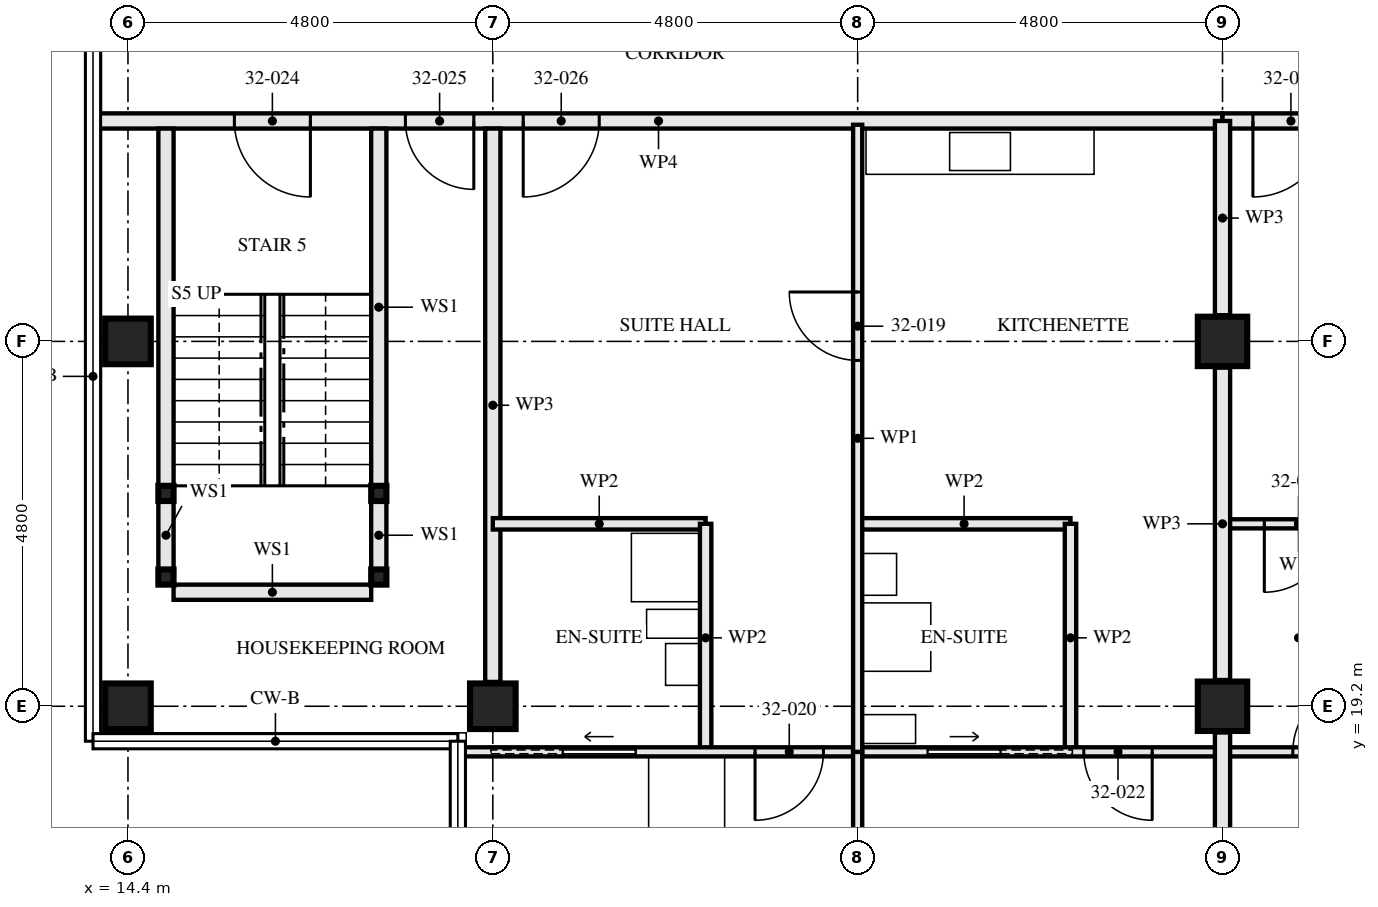
"""IFC4 building model, lengths in metres.
Left out: names, types, materials, properties, quantities, classifications, styles, units other than length and angle.
Written with IfcOpenShell. Run it as: python <this file> out.ifc"""

import sys

from ifc_helpers import new_model, si_unit, direction, frame, frame_2d, origin, origin_2d, place, context, subcontext, project, spatial, rectangle, hollow_rectangle, extrude, element, fill, save


model = new_model("IFC4")
c1 = context("Model", 3, precision=1e-05, world=origin(), true_north=direction((0.0, 1.0)))
c2 = subcontext(c1, "Body", "Model", "MODEL_VIEW")
j1 = project(units=[si_unit("LENGTHUNIT", "METRE"), si_unit("PLANEANGLEUNIT", "RADIAN")], contexts=[c1])
p1 = place(None, origin())
s1 = spatial("IfcSite", under=j1, at=p1, CompositionType="ELEMENT")
p2 = place(p1, origin())
s2 = spatial("IfcBuilding", under=s1, at=p2, CompositionType="ELEMENT")
p3 = place(p2, frame((0.0, 0.0, 119.0)))
s3 = spatial("IfcBuildingStorey", under=s2, at=p3, CompositionType="ELEMENT", Elevation=119.0)
for number, where, z_axis, x_axis in (
    (1, (14.4, 19.2, 0.0), (0.0, 0.0, 1.0), (0.0, 1.0, 0.0)),
    (2, (14.4, 24.0, 0.0), (0.0, 0.0, 1.0), (1.0, 0.0, 0.0)),
    (3, (19.2, 19.2, 0.0), (0.0, 0.0, 1.0), (0.0, 1.0, 0.0)),
):
    element("IfcColumn", number, at=place(p3, frame(where, z_axis=z_axis, x_axis=x_axis)), inside=s3, PredefinedType="COLUMN", context=c2, shape_type="SweptSolid", body=[
        extrude(hollow_rectangle(XDim=0.6, YDim=0.6, WallThickness=0.08, at=origin_2d()), origin(), (0.0, 0.0, 1.0), 3.5),
    ])
for number, where, z_axis, x_axis in (
    (4, (28.8, 19.2, 0.0), (0.0, 0.0, 1.0), (1.0, 0.0, 0.0)),
    (5, (28.8, 24.0, 0.0), (0.0, 0.0, 1.0), (1.0, 0.0, 0.0)),
):
    element("IfcColumn", number, at=place(p3, frame(where, z_axis=z_axis, x_axis=x_axis)), inside=s3, PredefinedType="COLUMN", context=c2, shape_type="SweptSolid", body=[
        extrude(hollow_rectangle(XDim=0.65, YDim=0.65, WallThickness=0.05, at=origin_2d()), origin(), (0.0, 0.0, 1.0), 3.5),
    ])
for number, where, z_axis, x_axis in (
    (6, (14.9, 20.9, 0.0), (0.0, 0.0, 1.0), (1.0, 0.0, 0.0)),
    (7, (17.7, 20.9, 0.0), (0.0, 0.0, 1.0), (1.0, 0.0, 0.0)),
    (8, (14.9, 22.0, 0.0), (0.0, 0.0, 1.0), (1.0, 0.0, 0.0)),
    (9, (17.7, 22.0, 0.0), (0.0, 0.0, 1.0), (1.0, 0.0, 0.0)),
):
    element("IfcColumn", number, at=place(p3, frame(where, z_axis=z_axis, x_axis=x_axis)), inside=s3, PredefinedType="COLUMN", context=c2, shape_type="SweptSolid", body=[
        extrude(hollow_rectangle(XDim=0.2, YDim=0.2, WallThickness=0.008, at=origin_2d()), origin(), (0.0, 0.0, 1.0), 3.33),
    ])
p4 = place(p3, frame((14.9, 21.0, 0.0), z_axis=(0.0, 0.0, 1.0), x_axis=(0.0, 1.0, 0.0)))
e10 = element("IfcWall", 10, at=p4, inside=s3, PredefinedType="SOLIDWALL", context=c2, shape_type="SweptSolid", body=[
    extrude(rectangle(XDim=0.9, YDim=0.2, at=frame_2d((0.45, 0.0))), origin(), (0.0, 0.0, 1.0), 2.99),
])
p5 = place(p3, frame((14.9, 22.1, 0.0), z_axis=(0.0, 0.0, 1.0), x_axis=(0.0, 1.0, 0.0)))
e11 = element("IfcWall", 11, at=p5, inside=s3, PredefinedType="SOLIDWALL", context=c2, shape_type="SweptSolid", body=[
    extrude(rectangle(XDim=4.7, YDim=0.2, at=frame_2d((2.35, 0.0))), origin(), (0.0, 0.0, 1.0), 2.99),
])
p6 = place(p3, frame((17.7, 21.0, 0.0), z_axis=(0.0, 0.0, 1.0), x_axis=(0.0, 1.0, 0.0)))
e12 = element("IfcWall", 12, at=p6, inside=s3, PredefinedType="SOLIDWALL", context=c2, shape_type="SweptSolid", body=[
    extrude(rectangle(XDim=0.9, YDim=0.2, at=frame_2d((0.45, 0.0))), origin(), (0.0, 0.0, 1.0), 2.99),
])
p7 = place(p3, frame((17.7, 22.1, 0.0), z_axis=(0.0, 0.0, 1.0), x_axis=(0.0, 1.0, 0.0)))
e13 = element("IfcWall", 13, at=p7, inside=s3, PredefinedType="SOLIDWALL", context=c2, shape_type="SweptSolid", body=[
    extrude(rectangle(XDim=4.7, YDim=0.2, at=frame_2d((2.35, 0.0))), origin(), (0.0, 0.0, 1.0), 2.99),
])
p8 = place(p3, frame((15.0, 20.7, 0.0), z_axis=(0.0, 0.0, 1.0), x_axis=(1.0, 0.0, 0.0)))
e14 = element("IfcWall", 14, at=p8, inside=s3, PredefinedType="SOLIDWALL", context=c2, shape_type="SweptSolid", body=[
    extrude(rectangle(XDim=2.6, YDim=0.2, at=frame_2d((1.3, 0.0))), origin(), (0.0, 0.0, 1.0), 3.33),
])
p9 = place(p3, frame((19.2, 19.52, 0.0), z_axis=(0.0, 0.0, 1.0), x_axis=(0.0, 1.0, 0.0)))
e15 = element("IfcWall", 15, at=p9, inside=s3, PredefinedType="PARTITIONING", context=c2, shape_type="SweptSolid", body=[
    extrude(rectangle(XDim=7.28, YDim=0.2, at=frame_2d((3.64, 0.0))), origin(), (0.0, 0.0, 1.0), 2.55),
])
p10 = place(p3, frame((22.0, 18.6, 0.0), z_axis=(0.0, 0.0, 1.0), x_axis=(0.0, 1.0, 0.0)))
e16 = element("IfcWall", 16, at=p10, inside=s3, PredefinedType="PARTITIONING", context=c2, shape_type="SweptSolid", body=[
    extrude(rectangle(XDim=3.0, YDim=0.15, at=frame_2d((1.5, 0.0))), origin(), (0.0, 0.0, 1.0), 2.55),
])
p11 = place(p3, frame((19.2, 21.6, 0.0), z_axis=(0.0, 0.0, 1.0), x_axis=(1.0, 0.0, 0.0)))
e17 = element("IfcWall", 17, at=p11, inside=s3, PredefinedType="PARTITIONING", context=c2, shape_type="SweptSolid", body=[
    extrude(rectangle(XDim=2.8, YDim=0.15, at=frame_2d((1.4, 0.0))), origin(), (0.0, 0.0, 1.0), 3.33),
])
p12 = place(p3, frame((26.8, 18.6, 0.0), z_axis=(0.0, 0.0, 1.0), x_axis=(0.0, 1.0, 0.0)))
e18 = element("IfcWall", 18, at=p12, inside=s3, PredefinedType="PARTITIONING", context=c2, shape_type="SweptSolid", body=[
    extrude(rectangle(XDim=3.0, YDim=0.15, at=frame_2d((1.5, 0.0))), origin(), (0.0, 0.0, 1.0), 2.55),
])
p13 = place(p3, frame((24.0, 21.6, 0.0), z_axis=(0.0, 0.0, 1.0), x_axis=(1.0, 0.0, 0.0)))
e19 = element("IfcWall", 19, at=p13, inside=s3, PredefinedType="PARTITIONING", context=c2, shape_type="SweptSolid", body=[
    extrude(rectangle(XDim=2.8, YDim=0.15, at=frame_2d((1.4, 0.0))), origin(), (0.0, 0.0, 1.0), 3.33),
])
p14 = place(p3, frame((24.0, 18.6, 0.0), z_axis=(0.0, 0.0, 1.0), x_axis=(0.0, 1.0, 0.0)))
e20 = element("IfcWall", 20, at=p14, inside=s3, PredefinedType="PARTITIONING", context=c2, shape_type="SweptSolid", body=[
    extrude(rectangle(XDim=8.25, YDim=0.12, at=frame_2d((4.125, 0.0))), origin(), (0.0, 0.0, 1.0), 2.55),
])
p15 = place(p14, frame((5.15, 0.0, 0.0)))
e21 = element("IfcOpeningElement", 21, at=p15, cuts=e20, PredefinedType="OPENING", context=c2, shape_type="SweptSolid", body=[
    extrude(rectangle(XDim=0.9, YDim=2.1, at=frame_2d((0.45, 1.05))), frame((0.0, 0.071, 0.0), z_axis=(0.0, -1.0, 0.0), x_axis=(1.0, 0.0, 0.0)), (0.0, 0.0, 1.0), 0.141),
])
p16 = place(p3, frame((18.76, 18.6, 0.0), z_axis=(0.0, 0.0, 1.0), x_axis=(1.0, 0.0, 0.0)))
e22 = element("IfcWall", 22, at=p16, inside=s3, PredefinedType="PARTITIONING", context=c2, shape_type="SweptSolid", body=[
    extrude(rectangle(XDim=5.24, YDim=0.12, at=frame_2d((2.62, 0.0))), origin(), (0.0, 0.0, 1.0), 2.32),
])
p17 = place(p16, frame((3.89, 0.0, 0.0)))
e23 = element("IfcOpeningElement", 23, at=p17, cuts=e22, PredefinedType="OPENING", context=c2, shape_type="SweptSolid", body=[
    extrude(rectangle(XDim=0.9, YDim=2.1, at=frame_2d((0.45, 1.05))), frame((0.0, 0.071, 0.0), z_axis=(0.0, -1.0, 0.0), x_axis=(1.0, 0.0, 0.0)), (0.0, 0.0, 1.0), 0.141),
])
p18 = place(p16, frame((1.365, 0.0, 0.0)))
e24 = element("IfcOpeningElement", 24, at=p18, cuts=e22, PredefinedType="OPENING", context=c2, shape_type="SweptSolid", body=[
    extrude(rectangle(XDim=0.95, YDim=2.1, at=frame_2d((0.475, 1.05))), frame((0.0, 0.071, 0.0), z_axis=(0.0, -1.0, 0.0), x_axis=(1.0, 0.0, 0.0)), (0.0, 0.0, 1.0), 0.141),
])
p19 = place(p3, frame((24.0, 18.6, 0.0), z_axis=(0.0, 0.0, 1.0), x_axis=(1.0, 0.0, 0.0)))
e25 = element("IfcWall", 25, at=p19, inside=s3, PredefinedType="PARTITIONING", context=c2, shape_type="SweptSolid", body=[
    extrude(rectangle(XDim=4.8, YDim=0.12, at=frame_2d((2.4, 0.0))), origin(), (0.0, 0.0, 1.0), 3.33),
])
p20 = place(p19, frame((2.975, 0.0, 0.0)))
e26 = element("IfcOpeningElement", 26, at=p20, cuts=e25, PredefinedType="OPENING", context=c2, shape_type="SweptSolid", body=[
    extrude(rectangle(XDim=0.9, YDim=2.1, at=frame_2d((0.45, 1.05))), frame((0.0, 0.071, 0.0), z_axis=(0.0, -1.0, 0.0), x_axis=(1.0, 0.0, 0.0)), (0.0, 0.0, 1.0), 0.141),
])
p21 = place(p19, frame((0.925, 0.0, 0.0)))
e27 = element("IfcOpeningElement", 27, at=p21, cuts=e25, PredefinedType="OPENING", context=c2, shape_type="SweptSolid", body=[
    extrude(rectangle(XDim=0.95, YDim=2.1, at=frame_2d((0.475, 1.05))), frame((0.0, 0.071, 0.0), z_axis=(0.0, -1.0, 0.0), x_axis=(1.0, 0.0, 0.0)), (0.0, 0.0, 1.0), 0.141),
])
p22 = place(p3, frame((24.0, 14.72, 0.0), z_axis=(0.0, 0.0, 1.0), x_axis=(0.0, 1.0, 0.0)))
e28 = element("IfcWall", 28, at=p22, inside=s3, PredefinedType="PARTITIONING", context=c2, shape_type="SweptSolid", body=[
    extrude(rectangle(XDim=3.88, YDim=0.12, at=frame_2d((1.94, 0.0))), origin(), (0.0, 0.0, 1.0), 3.33),
])
p23 = place(p3, frame((13.96, 26.9, 0.0), z_axis=(0.0, 0.0, 1.0), x_axis=(1.0, 0.0, 0.0)))
e29 = element("IfcWall", 29, at=p23, inside=s3, PredefinedType="PARTITIONING", context=c2, shape_type="SweptSolid", body=[
    extrude(rectangle(XDim=14.84, YDim=0.2, at=frame_2d((7.42, 0.0))), origin(), (0.0, 0.0, 1.0), 2.32),
])
p24 = place(p23, frame((1.84, 0.0, 0.0)))
e30 = element("IfcOpeningElement", 30, at=p24, cuts=e29, PredefinedType="OPENING", context=c2, shape_type="SweptSolid", body=[
    extrude(rectangle(XDim=1.0, YDim=2.1, at=frame_2d((0.5, 1.05))), frame((0.0, 0.111, 0.0), z_axis=(0.0, -1.0, 0.0), x_axis=(1.0, 0.0, 0.0)), (0.0, 0.0, 1.0), 0.221),
])
p25 = place(p23, frame((4.09, 0.0, 0.0)))
e31 = element("IfcOpeningElement", 31, at=p25, cuts=e29, PredefinedType="OPENING", context=c2, shape_type="SweptSolid", body=[
    extrude(rectangle(XDim=0.9, YDim=2.1, at=frame_2d((0.45, 1.05))), frame((0.0, 0.111, 0.0), z_axis=(0.0, -1.0, 0.0), x_axis=(1.0, 0.0, 0.0)), (0.0, 0.0, 1.0), 0.221),
])
p26 = place(p23, frame((5.64, 0.0, 0.0)))
e32 = element("IfcOpeningElement", 32, at=p26, cuts=e29, PredefinedType="OPENING", context=c2, shape_type="SweptSolid", body=[
    extrude(rectangle(XDim=1.0, YDim=2.1, at=frame_2d((0.5, 1.05))), frame((0.0, 0.111, 0.0), z_axis=(0.0, -1.0, 0.0), x_axis=(1.0, 0.0, 0.0)), (0.0, 0.0, 1.0), 0.221),
])
p27 = place(p3, frame((28.8, 21.6, 0.0), z_axis=(0.0, 0.0, 1.0), x_axis=(1.0, 0.0, 0.0)))
e33 = element("IfcWall", 33, at=p27, inside=s3, PredefinedType="PARTITIONING", context=c2, shape_type="SweptSolid", body=[
    extrude(rectangle(XDim=2.0, YDim=0.12, at=frame_2d((1.0, 0.0))), origin(), (0.0, 0.0, 1.0), 3.33),
])
p28 = place(p27, frame((0.55, 0.0, 0.0)))
e34 = element("IfcOpeningElement", 34, at=p28, cuts=e33, PredefinedType="OPENING", context=c2, shape_type="SweptSolid", body=[
    extrude(rectangle(XDim=0.9, YDim=2.1, at=frame_2d((0.45, 1.05))), frame((0.0, 0.071, 0.0), z_axis=(0.0, -1.0, 0.0), x_axis=(1.0, 0.0, 0.0)), (0.0, 0.0, 1.0), 0.141),
])
p29 = place(p3, frame((28.8, 18.6, 0.0), z_axis=(0.0, 0.0, 1.0), x_axis=(1.0, 0.0, 0.0)))
e35 = element("IfcWall", 35, at=p29, inside=s3, PredefinedType="PARTITIONING", context=c2, shape_type="SweptSolid", body=[
    extrude(rectangle(XDim=4.8, YDim=0.12, at=frame_2d((2.4, 0.0))), origin(), (0.0, 0.0, 1.0), 3.33),
])
p30 = place(p29, frame((0.925, 0.0, 0.0)))
e36 = element("IfcOpeningElement", 36, at=p30, cuts=e35, PredefinedType="OPENING", context=c2, shape_type="SweptSolid", body=[
    extrude(rectangle(XDim=0.9, YDim=2.1, at=frame_2d((0.45, 1.05))), frame((0.0, 0.071, 0.0), z_axis=(0.0, -1.0, 0.0), x_axis=(1.0, 0.0, 0.0)), (0.0, 0.0, 1.0), 0.141),
])
p31 = place(p29, frame((2.925, 0.0, 0.0)))
e37 = element("IfcOpeningElement", 37, at=p31, cuts=e35, PredefinedType="OPENING", context=c2, shape_type="SweptSolid", body=[
    extrude(rectangle(XDim=0.95, YDim=2.1, at=frame_2d((0.475, 1.05))), frame((0.0, 0.071, 0.0), z_axis=(0.0, -1.0, 0.0), x_axis=(1.0, 0.0, 0.0)), (0.0, 0.0, 1.0), 0.141),
])
p32 = place(p3, frame((28.8, 26.9, 0.0), z_axis=(0.0, 0.0, 1.0), x_axis=(1.0, 0.0, 0.0)))
e38 = element("IfcWall", 38, at=p32, inside=s3, PredefinedType="PARTITIONING", context=c2, shape_type="SweptSolid", body=[
    extrude(rectangle(XDim=9.6, YDim=0.2, at=frame_2d((4.8, 0.0))), origin(), (0.0, 0.0, 1.0), 3.33),
])
p33 = place(p32, frame((0.4, 0.0, 0.0)))
e39 = element("IfcOpeningElement", 39, at=p33, cuts=e38, PredefinedType="OPENING", context=c2, shape_type="SweptSolid", body=[
    extrude(rectangle(XDim=1.0, YDim=2.1, at=frame_2d((0.5, 1.05))), frame((0.0, 0.111, 0.0), z_axis=(0.0, -1.0, 0.0), x_axis=(1.0, 0.0, 0.0)), (0.0, 0.0, 1.0), 0.221),
])
p34 = place(p32, frame((5.2, 0.0, 0.0)))
e40 = element("IfcOpeningElement", 40, at=p34, cuts=e38, PredefinedType="OPENING", context=c2, shape_type="SweptSolid", body=[
    extrude(rectangle(XDim=1.0, YDim=2.1, at=frame_2d((0.5, 1.05))), frame((0.0, 0.111, 0.0), z_axis=(0.0, -1.0, 0.0), x_axis=(1.0, 0.0, 0.0)), (0.0, 0.0, 1.0), 0.221),
])
p35 = place(p3, frame((28.8, 14.72, 0.0), z_axis=(0.0, 0.0, 1.0), x_axis=(0.0, 1.0, 0.0)))
e41 = element("IfcWall", 41, at=p35, inside=s3, PredefinedType="PARTITIONING", context=c2, shape_type="SweptSolid", body=[
    extrude(rectangle(XDim=4.135, YDim=0.2, at=frame_2d((2.067, 0.0))), origin(), (0.0, 0.0, 1.0), 2.32),
])
p36 = place(p3, frame((28.8, 19.545, 0.0), z_axis=(0.0, 0.0, 1.0), x_axis=(0.0, 1.0, 0.0)))
e42 = element("IfcWall", 42, at=p36, inside=s3, PredefinedType="PARTITIONING", context=c2, shape_type="SweptSolid", body=[
    extrude(rectangle(XDim=4.11, YDim=0.2, at=frame_2d((2.055, 0.0))), origin(), (0.0, 0.0, 1.0), 2.32),
])
p37 = place(p3, frame((28.8, 24.345, 0.0), z_axis=(0.0, 0.0, 1.0), x_axis=(0.0, 1.0, 0.0)))
e43 = element("IfcWall", 43, at=p37, inside=s3, PredefinedType="PARTITIONING", context=c2, shape_type="SweptSolid", body=[
    extrude(rectangle(XDim=2.555, YDim=0.2, at=frame_2d((1.277, 0.0))), origin(), (0.0, 0.0, 1.0), 2.32),
])
p38 = place(p15, origin())
e44 = element("IfcDoor", 44, at=p38, inside=s3, OperationType="SINGLE_SWING_LEFT", PredefinedType="DOOR", context=c2, shape_type="SweptSolid", body=[
    extrude(rectangle(XDim=0.9, YDim=2.1, at=frame_2d((0.45, 1.05))), frame((0.0, 0.022, 0.0), z_axis=(0.0, -1.0, 0.0), x_axis=(1.0, 0.0, 0.0)), (0.0, 0.0, 1.0), 0.044),
])
fill(e21, e44)
p39 = place(p17, frame((0.9, 0.0, 0.0), z_axis=(0.0, 0.0, 1.0), x_axis=(-1.0, 0.0, 0.0)))
e45 = element("IfcDoor", 45, at=p39, inside=s3, OperationType="SINGLE_SWING_LEFT", PredefinedType="DOOR", context=c2, shape_type="SweptSolid", body=[
    extrude(rectangle(XDim=0.9, YDim=2.1, at=frame_2d((0.45, 1.05))), frame((0.0, 0.022, 0.0), z_axis=(0.0, -1.0, 0.0), x_axis=(1.0, 0.0, 0.0)), (0.0, 0.0, 1.0), 0.044),
])
fill(e23, e45)
p40 = place(p18, origin())
e46 = element("IfcDoor", 46, at=p40, inside=s3, OperationType="SLIDING_TO_RIGHT", PredefinedType="DOOR", context=c2, shape_type="SweptSolid", body=[
    extrude(rectangle(XDim=0.95, YDim=2.1, at=frame_2d((0.475, 1.05))), frame((0.0, 0.022, 0.0), z_axis=(0.0, -1.0, 0.0), x_axis=(1.0, 0.0, 0.0)), (0.0, 0.0, 1.0), 0.044),
])
fill(e24, e46)
p41 = place(p20, frame((0.9, 0.0, 0.0), z_axis=(0.0, 0.0, 1.0), x_axis=(-1.0, 0.0, 0.0)))
e47 = element("IfcDoor", 47, at=p41, inside=s3, OperationType="SINGLE_SWING_RIGHT", PredefinedType="DOOR", context=c2, shape_type="SweptSolid", body=[
    extrude(rectangle(XDim=0.9, YDim=2.1, at=frame_2d((0.45, 1.05))), frame((0.0, 0.022, 0.0), z_axis=(0.0, -1.0, 0.0), x_axis=(1.0, 0.0, 0.0)), (0.0, 0.0, 1.0), 0.044),
])
fill(e26, e47)
p42 = place(p21, origin())
e48 = element("IfcDoor", 48, at=p42, inside=s3, OperationType="SLIDING_TO_LEFT", PredefinedType="DOOR", context=c2, shape_type="SweptSolid", body=[
    extrude(rectangle(XDim=0.95, YDim=2.1, at=frame_2d((0.475, 1.05))), frame((0.0, 0.022, 0.0), z_axis=(0.0, -1.0, 0.0), x_axis=(1.0, 0.0, 0.0)), (0.0, 0.0, 1.0), 0.044),
])
fill(e27, e48)
p43 = place(p24, frame((1.0, 0.0, 0.0), z_axis=(0.0, 0.0, 1.0), x_axis=(-1.0, 0.0, 0.0)))
e49 = element("IfcDoor", 49, at=p43, inside=s3, OperationType="SINGLE_SWING_RIGHT", PredefinedType="DOOR", context=c2, shape_type="SweptSolid", body=[
    extrude(rectangle(XDim=1.0, YDim=2.1, at=frame_2d((0.5, 1.05))), frame((0.0, 0.032, 0.0), z_axis=(0.0, -1.0, 0.0), x_axis=(1.0, 0.0, 0.0)), (0.0, 0.0, 1.0), 0.064),
])
fill(e30, e49)
p44 = place(p25, frame((0.9, 0.0, 0.0), z_axis=(0.0, 0.0, 1.0), x_axis=(-1.0, 0.0, 0.0)))
e50 = element("IfcDoor", 50, at=p44, inside=s3, OperationType="SINGLE_SWING_RIGHT", PredefinedType="DOOR", context=c2, shape_type="SweptSolid", body=[
    extrude(rectangle(XDim=0.9, YDim=2.1, at=frame_2d((0.45, 1.05))), frame((0.0, 0.027, 0.0), z_axis=(0.0, -1.0, 0.0), x_axis=(1.0, 0.0, 0.0)), (0.0, 0.0, 1.0), 0.054),
])
fill(e31, e50)
p45 = place(p26, frame((1.0, 0.0, 0.0), z_axis=(0.0, 0.0, 1.0), x_axis=(-1.0, 0.0, 0.0)))
e51 = element("IfcDoor", 51, at=p45, inside=s3, OperationType="SINGLE_SWING_LEFT", PredefinedType="DOOR", context=c2, shape_type="SweptSolid", body=[
    extrude(rectangle(XDim=1.0, YDim=2.1, at=frame_2d((0.5, 1.05))), frame((0.0, 0.027, 0.0), z_axis=(0.0, -1.0, 0.0), x_axis=(1.0, 0.0, 0.0)), (0.0, 0.0, 1.0), 0.054),
])
fill(e32, e51)
p46 = place(p28, frame((0.9, 0.0, 0.0), z_axis=(0.0, 0.0, 1.0), x_axis=(-1.0, 0.0, 0.0)))
e52 = element("IfcDoor", 52, at=p46, inside=s3, OperationType="SINGLE_SWING_LEFT", PredefinedType="DOOR", context=c2, shape_type="SweptSolid", body=[
    extrude(rectangle(XDim=0.9, YDim=2.1, at=frame_2d((0.45, 1.05))), frame((0.0, 0.022, 0.0), z_axis=(0.0, -1.0, 0.0), x_axis=(1.0, 0.0, 0.0)), (0.0, 0.0, 1.0), 0.044),
])
fill(e34, e52)
p47 = place(p30, origin())
e53 = element("IfcDoor", 53, at=p47, inside=s3, OperationType="SINGLE_SWING_LEFT", PredefinedType="DOOR", context=c2, shape_type="SweptSolid", body=[
    extrude(rectangle(XDim=0.9, YDim=2.1, at=frame_2d((0.45, 1.05))), frame((0.0, 0.022, 0.0), z_axis=(0.0, -1.0, 0.0), x_axis=(1.0, 0.0, 0.0)), (0.0, 0.0, 1.0), 0.044),
])
fill(e36, e53)
p48 = place(p33, frame((1.0, 0.0, 0.0), z_axis=(0.0, 0.0, 1.0), x_axis=(-1.0, 0.0, 0.0)))
e54 = element("IfcDoor", 54, at=p48, inside=s3, OperationType="SINGLE_SWING_LEFT", PredefinedType="DOOR", context=c2, shape_type="SweptSolid", body=[
    extrude(rectangle(XDim=1.0, YDim=2.1, at=frame_2d((0.5, 1.05))), frame((0.0, 0.027, 0.0), z_axis=(0.0, -1.0, 0.0), x_axis=(1.0, 0.0, 0.0)), (0.0, 0.0, 1.0), 0.054),
])
fill(e39, e54)
save(model, sys.argv[1])
